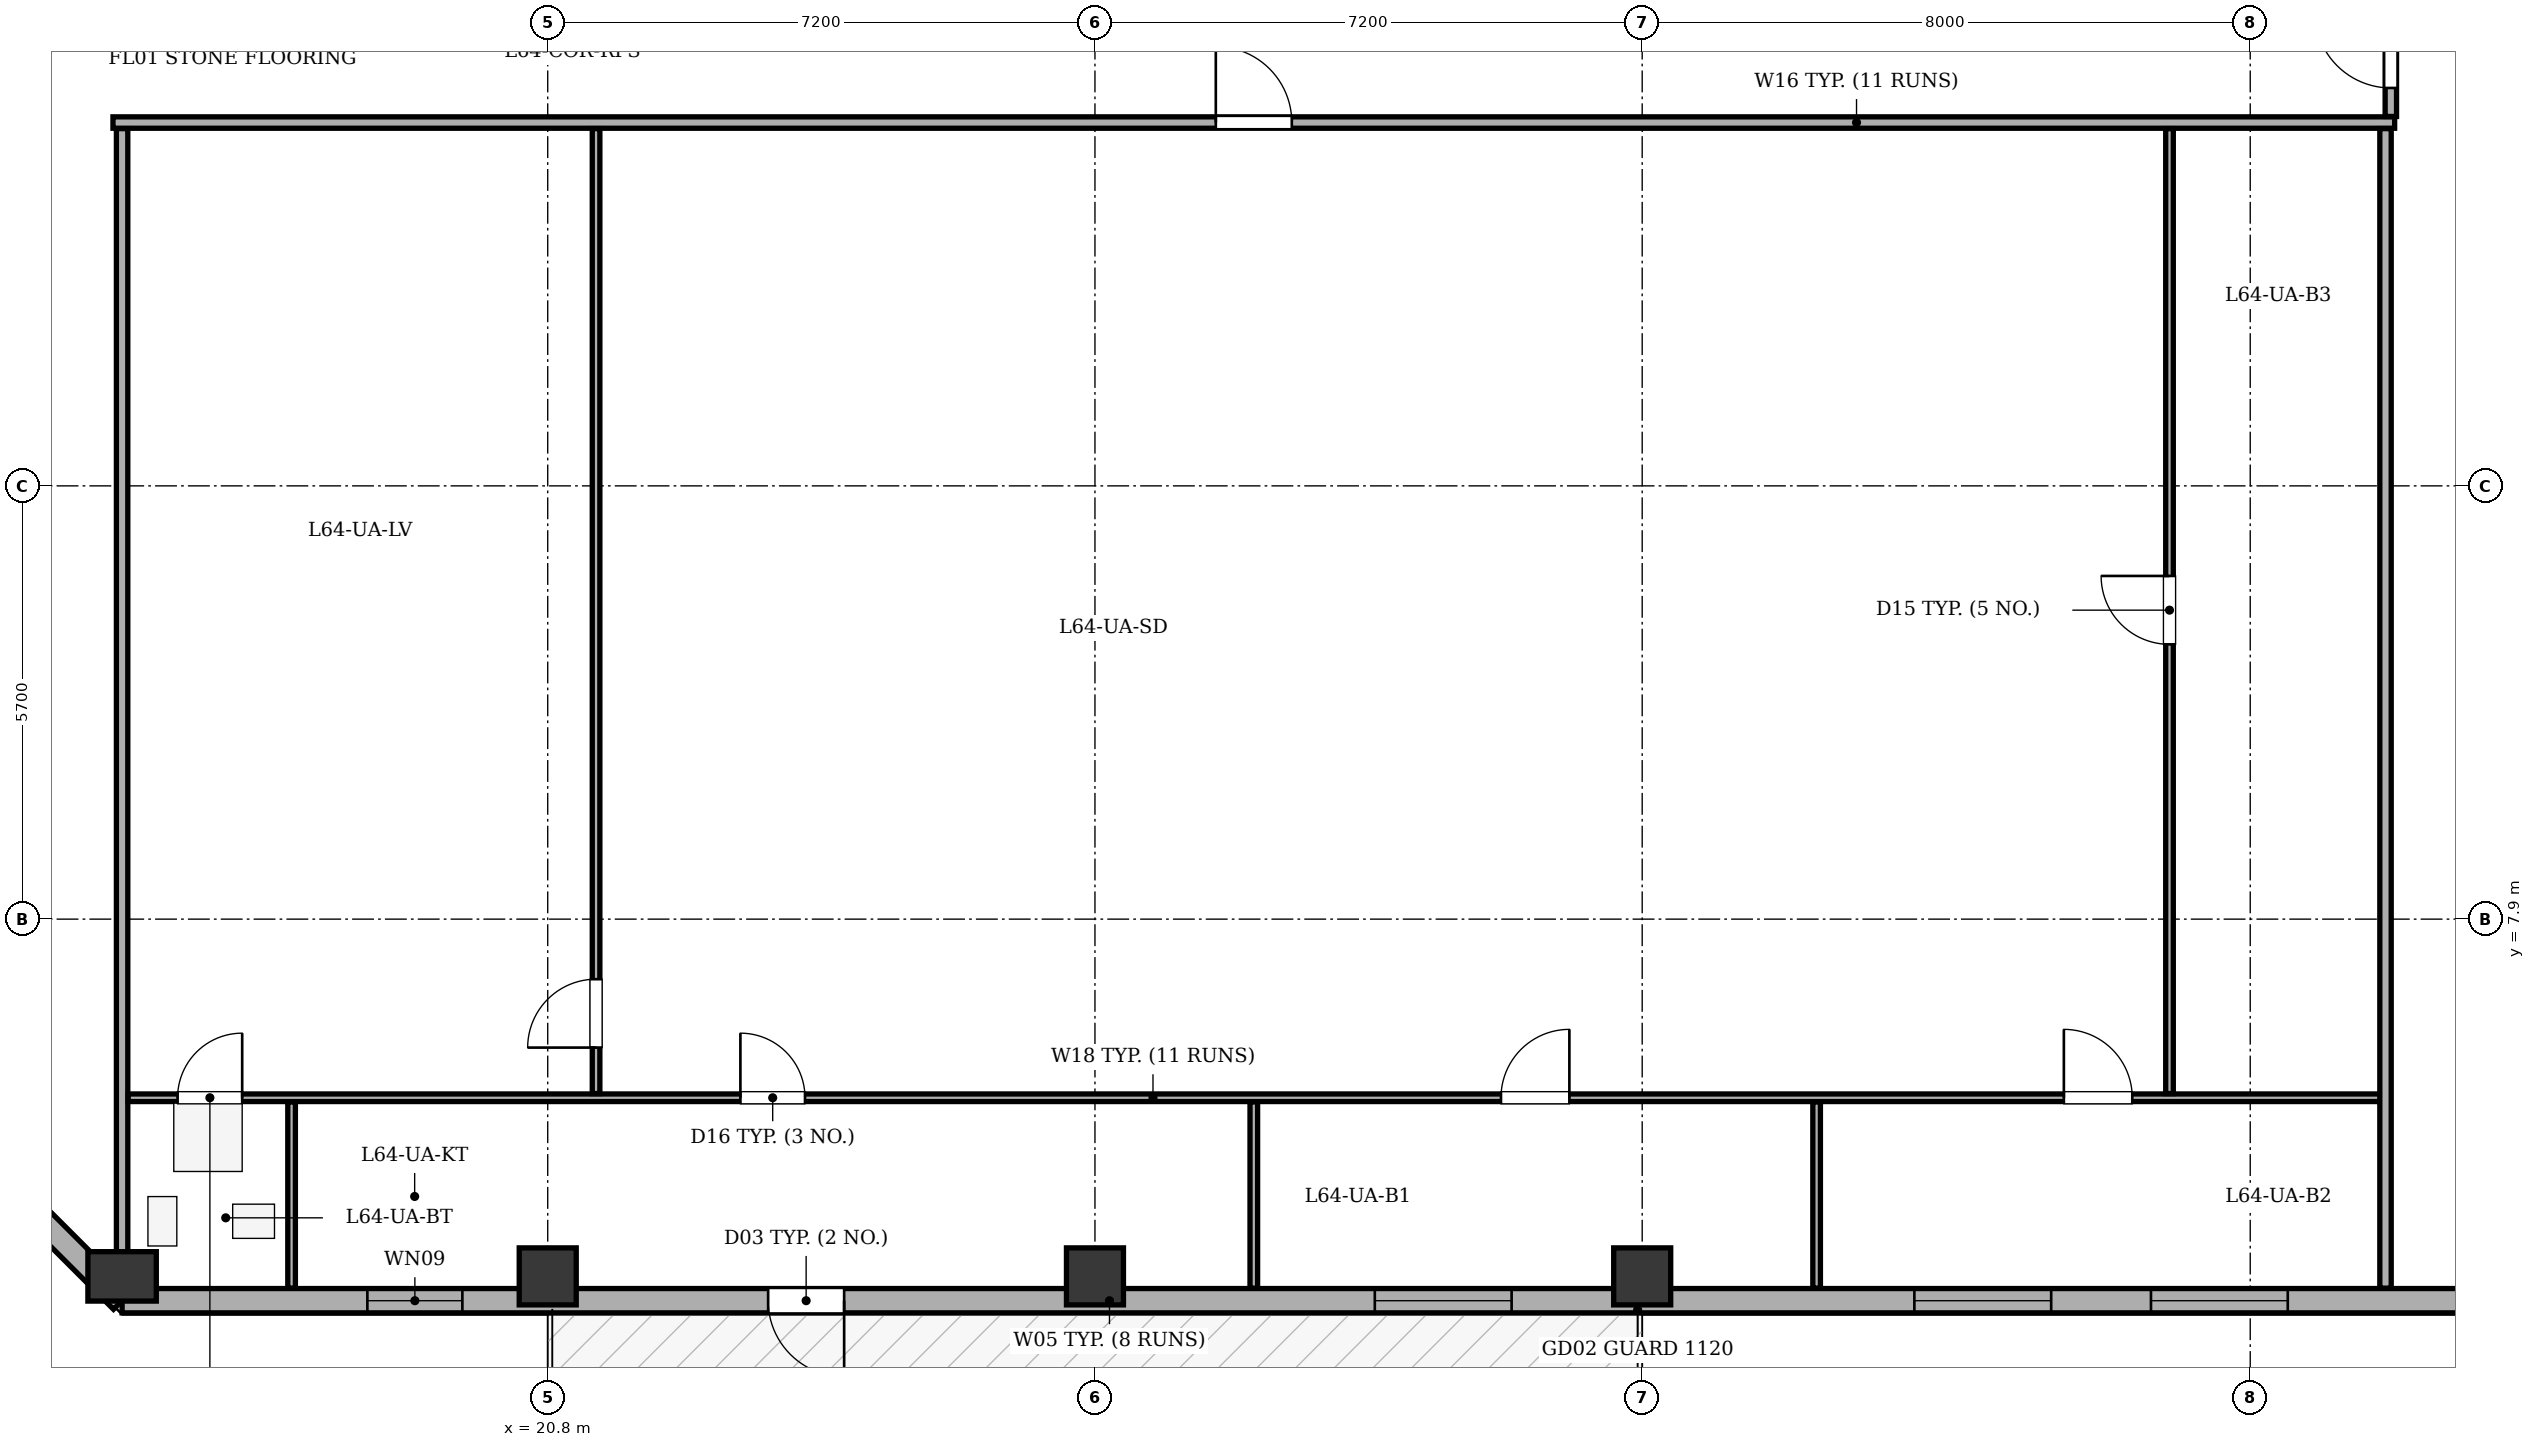
"""IFC4 building model, lengths in metres.
Left out: names, types, materials, properties, quantities, classifications, styles, units other than length and angle.
Written with IfcOpenShell. Run it as: python <this file> out.ifc"""

import sys

from ifc_helpers import new_model, si_unit, direction, frame, frame_2d, origin, origin_2d, place, context, subcontext, project, spatial, rectangle, extrude, element, fill, save


model = new_model("IFC4")
c1 = context("Model", 3, precision=1e-05, world=origin(), true_north=direction((0.0, 1.0)))
c2 = subcontext(c1, "Body", "Model", "MODEL_VIEW")
j1 = project(units=[si_unit("LENGTHUNIT", "METRE"), si_unit("PLANEANGLEUNIT", "RADIAN")], contexts=[c1])
p1 = place(None, origin())
s1 = spatial("IfcSite", under=j1, at=p1, CompositionType="ELEMENT")
p2 = place(p1, origin())
s2 = spatial("IfcBuilding", under=s1, at=p2, CompositionType="ELEMENT")
p3 = place(p2, frame((0.0, 0.0, 244.9)))
s3 = spatial("IfcBuildingStorey", under=s2, at=p3, CompositionType="ELEMENT", Elevation=244.9)
p4 = place(p3, frame((15.2, 3.2, 0.0), z_axis=(0.0, 0.0, 1.0), x_axis=(1.0, 0.0, 0.0)))
e1 = element("IfcColumn", 1, at=p4, inside=s3, PredefinedType="COLUMN", context=c2, shape_type="SweptSolid", body=[
    extrude(rectangle(XDim=0.65, YDim=0.9, at=origin_2d()), origin(), (0.0, 0.0, 1.0), 3.4),
])
for number, where, z_axis, x_axis in (
    (2, (20.8, 3.2, 0.0), (0.0, 0.0, 1.0), (1.0, 0.0, 0.0)),
    (3, (28.0, 3.2, 0.0), (0.0, 0.0, 1.0), (1.0, 0.0, 0.0)),
    (4, (35.2, 3.2, 0.0), (0.0, 0.0, 1.0), (1.0, 0.0, 0.0)),
):
    element("IfcColumn", number, at=place(p3, frame(where, z_axis=z_axis, x_axis=x_axis)), inside=s3, PredefinedType="COLUMN", context=c2, shape_type="SweptSolid", body=[
        extrude(rectangle(XDim=0.75, YDim=0.75, at=origin_2d()), origin(), (0.0, 0.0, 1.0), 3.4),
    ])
p5 = place(p3, frame((51.2, 2.88, 0.0), z_axis=(0.0, 0.0, 1.0), x_axis=(-1.0, 0.0, 0.0)))
e5 = element("IfcWall", 5, at=p5, inside=s3, PredefinedType="STANDARD", context=c2, shape_type="SweptSolid", body=[
    extrude(rectangle(XDim=36.0, YDim=0.32, at=frame_2d((18.0, 0.0))), origin(), (0.0, 0.0, 1.0), 2.335),
])
p6 = place(p5, frame((26.5, 0.0, 0.0)))
e6 = element("IfcOpeningElement", 6, at=p6, cuts=e5, PredefinedType="OPENING", context=c2, shape_type="SweptSolid", body=[
    extrude(rectangle(XDim=1.0, YDim=2.02, at=frame_2d((0.5, 1.01))), frame((0.0, 0.17, 0.0), z_axis=(0.0, -1.0, 0.0), x_axis=(1.0, 0.0, 0.0)), (0.0, 0.0, 1.0), 0.34),
])
p7 = place(p5, frame((2.31, 0.0, 0.75)))
e7 = element("IfcOpeningElement", 7, at=p7, cuts=e5, PredefinedType="OPENING", context=c2, shape_type="SweptSolid", body=[
    extrude(rectangle(XDim=1.8, YDim=1.465, at=frame_2d((0.9, 0.732))), frame((0.0, 0.17, 0.0), z_axis=(0.0, -1.0, 0.0), x_axis=(1.0, 0.0, 0.0)), (0.0, 0.0, 1.0), 0.34),
])
p8 = place(p5, frame((7.506, 0.0, 0.75)))
e8 = element("IfcOpeningElement", 8, at=p8, cuts=e5, PredefinedType="OPENING", context=c2, shape_type="SweptSolid", body=[
    extrude(rectangle(XDim=1.8, YDim=1.465, at=frame_2d((0.9, 0.732))), frame((0.0, 0.17, 0.0), z_axis=(0.0, -1.0, 0.0), x_axis=(1.0, 0.0, 0.0)), (0.0, 0.0, 1.0), 0.34),
])
p9 = place(p5, frame((10.619, 0.0, 0.75)))
e9 = element("IfcOpeningElement", 9, at=p9, cuts=e5, PredefinedType="OPENING", context=c2, shape_type="SweptSolid", body=[
    extrude(rectangle(XDim=1.8, YDim=1.465, at=frame_2d((0.9, 0.732))), frame((0.0, 0.17, 0.0), z_axis=(0.0, -1.0, 0.0), x_axis=(1.0, 0.0, 0.0)), (0.0, 0.0, 1.0), 0.34),
])
p10 = place(p5, frame((17.718, 0.0, 0.75)))
e10 = element("IfcOpeningElement", 10, at=p10, cuts=e5, PredefinedType="OPENING", context=c2, shape_type="SweptSolid", body=[
    extrude(rectangle(XDim=1.8, YDim=1.465, at=frame_2d((0.9, 0.732))), frame((0.0, 0.17, 0.0), z_axis=(0.0, -1.0, 0.0), x_axis=(1.0, 0.0, 0.0)), (0.0, 0.0, 1.0), 0.34),
])
p11 = place(p5, frame((31.523, 0.0, 0.75)))
e11 = element("IfcOpeningElement", 11, at=p11, cuts=e5, PredefinedType="OPENING", context=c2, shape_type="SweptSolid", body=[
    extrude(rectangle(XDim=1.25, YDim=1.465, at=frame_2d((0.625, 0.732))), frame((0.0, 0.17, 0.0), z_axis=(0.0, -1.0, 0.0), x_axis=(1.0, 0.0, 0.0)), (0.0, 0.0, 1.0), 0.34),
])
p12 = place(p3, frame((15.2, 2.88, 0.0), z_axis=(0.0, 0.0, 1.0), x_axis=(-0.707106781187, 0.707106781187, 0.0)))
e12 = element("IfcWall", 12, at=p12, inside=s3, PredefinedType="STANDARD", context=c2, shape_type="SweptSolid", body=[
    extrude(rectangle(XDim=6.11, YDim=0.32, at=frame_2d((3.055, 0.0))), origin(), (0.0, 0.0, 1.0), 2.335),
])
p13 = place(p12, frame((2.355, 0.0, 0.75)))
e13 = element("IfcOpeningElement", 13, at=p13, cuts=e12, PredefinedType="OPENING", context=c2, shape_type="SweptSolid", body=[
    extrude(rectangle(XDim=1.4, YDim=1.465, at=frame_2d((0.7, 0.732))), frame((0.0, 0.17, 0.0), z_axis=(0.0, -1.0, 0.0), x_axis=(1.0, 0.0, 0.0)), (0.0, 0.0, 1.0), 0.34),
])
p14 = place(p3, frame((15.08, 18.38, 0.0), z_axis=(0.0, 0.0, 1.0), x_axis=(1.0, 0.0, 0.0)))
e14 = element("IfcWall", 14, at=p14, inside=s3, PredefinedType="PARTITIONING", context=c2, shape_type="SweptSolid", body=[
    extrude(rectangle(XDim=30.02, YDim=0.15, at=frame_2d((15.01, 0.0))), origin(), (0.0, 0.0, 1.0), 2.95),
])
p15 = place(p14, frame((14.51, 0.0, 0.0)))
e15 = element("IfcOpeningElement", 15, at=p15, cuts=e14, PredefinedType="OPENING", context=c2, shape_type="SweptSolid", body=[
    extrude(rectangle(XDim=1.0, YDim=2.1, at=frame_2d((0.5, 1.05))), frame((0.0, 0.085, 0.0), z_axis=(0.0, -1.0, 0.0), x_axis=(1.0, 0.0, 0.0)), (0.0, 0.0, 1.0), 0.17),
])
p16 = place(p3, frame((15.2, 3.045, 0.0), z_axis=(0.0, 0.0, 1.0), x_axis=(0.0, 1.0, 0.0)))
e16 = element("IfcWall", 16, at=p16, inside=s3, PredefinedType="PARTITIONING", context=c2, shape_type="SweptSolid", body=[
    extrude(rectangle(XDim=15.255, YDim=0.15, at=frame_2d((7.627, 0.0))), origin(), (0.0, 0.0, 1.0), 2.95),
])
p17 = place(p3, frame((15.28, 5.55, 0.0), z_axis=(0.0, 0.0, 1.0), x_axis=(1.0, 0.0, 0.0)))
e17 = element("IfcWall", 17, at=p17, inside=s3, PredefinedType="PARTITIONING", context=c2, shape_type="SweptSolid", body=[
    extrude(rectangle(XDim=29.74, YDim=0.1, at=frame_2d((14.87, 0.0))), origin(), (0.0, 0.0, 1.0), 2.95),
])
p18 = place(p17, frame((0.65, 0.0, 0.0)))
e18 = element("IfcOpeningElement", 18, at=p18, cuts=e17, PredefinedType="OPENING", context=c2, shape_type="SweptSolid", body=[
    extrude(rectangle(XDim=0.85, YDim=2.05, at=frame_2d((0.425, 1.025))), frame((0.0, 0.06, 0.0), z_axis=(0.0, -1.0, 0.0), x_axis=(1.0, 0.0, 0.0)), (0.0, 0.0, 1.0), 0.12),
])
p19 = place(p17, frame((8.055, 0.0, 0.0)))
e19 = element("IfcOpeningElement", 19, at=p19, cuts=e17, PredefinedType="OPENING", context=c2, shape_type="SweptSolid", body=[
    extrude(rectangle(XDim=0.85, YDim=2.05, at=frame_2d((0.425, 1.025))), frame((0.0, 0.06, 0.0), z_axis=(0.0, -1.0, 0.0), x_axis=(1.0, 0.0, 0.0)), (0.0, 0.0, 1.0), 0.12),
])
p20 = place(p17, frame((18.062, 0.0, 0.0)))
e20 = element("IfcOpeningElement", 20, at=p20, cuts=e17, PredefinedType="OPENING", context=c2, shape_type="SweptSolid", body=[
    extrude(rectangle(XDim=0.9, YDim=2.05, at=frame_2d((0.45, 1.025))), frame((0.0, 0.06, 0.0), z_axis=(0.0, -1.0, 0.0), x_axis=(1.0, 0.0, 0.0)), (0.0, 0.0, 1.0), 0.12),
])
p21 = place(p17, frame((25.468, 0.0, 0.0)))
e21 = element("IfcOpeningElement", 21, at=p21, cuts=e17, PredefinedType="OPENING", context=c2, shape_type="SweptSolid", body=[
    extrude(rectangle(XDim=0.9, YDim=2.05, at=frame_2d((0.45, 1.025))), frame((0.0, 0.06, 0.0), z_axis=(0.0, -1.0, 0.0), x_axis=(1.0, 0.0, 0.0)), (0.0, 0.0, 1.0), 0.12),
])
p22 = place(p3, frame((42.138, 5.605, 0.0), z_axis=(0.0, 0.0, 1.0), x_axis=(0.0, 1.0, 0.0)))
e22 = element("IfcWall", 22, at=p22, inside=s3, PredefinedType="PARTITIONING", context=c2, shape_type="SweptSolid", body=[
    extrude(rectangle(XDim=12.695, YDim=0.1, at=frame_2d((6.348, 0.0))), origin(), (0.0, 0.0, 1.0), 2.385),
])
p23 = place(p22, frame((5.91, 0.0, 0.0)))
e23 = element("IfcOpeningElement", 23, at=p23, cuts=e22, PredefinedType="OPENING", context=c2, shape_type="SweptSolid", body=[
    extrude(rectangle(XDim=0.9, YDim=2.05, at=frame_2d((0.45, 1.025))), frame((0.0, 0.06, 0.0), z_axis=(0.0, -1.0, 0.0), x_axis=(1.0, 0.0, 0.0)), (0.0, 0.0, 1.0), 0.12),
])
p24 = place(p3, frame((21.436, 5.605, 0.0), z_axis=(0.0, 0.0, 1.0), x_axis=(0.0, 1.0, 0.0)))
e24 = element("IfcWall", 24, at=p24, inside=s3, PredefinedType="PARTITIONING", context=c2, shape_type="SweptSolid", body=[
    extrude(rectangle(XDim=12.695, YDim=0.1, at=frame_2d((6.348, 0.0))), origin(), (0.0, 0.0, 1.0), 2.95),
])
p25 = place(p24, frame((0.605, 0.0, 0.0)))
e25 = element("IfcOpeningElement", 25, at=p25, cuts=e24, PredefinedType="OPENING", context=c2, shape_type="SweptSolid", body=[
    extrude(rectangle(XDim=0.9, YDim=2.05, at=frame_2d((0.45, 1.025))), frame((0.0, 0.06, 0.0), z_axis=(0.0, -1.0, 0.0), x_axis=(1.0, 0.0, 0.0)), (0.0, 0.0, 1.0), 0.12),
])
for number, where, z_axis, x_axis in (
    (26, (17.43, 3.045, 0.0), (0.0, 0.0, 1.0), (0.0, 1.0, 0.0)),
    (27, (30.09, 3.045, 0.0), (0.0, 0.0, 1.0), (0.0, 1.0, 0.0)),
    (28, (37.495, 3.045, 0.0), (0.0, 0.0, 1.0), (0.0, 1.0, 0.0)),
):
    element("IfcWall", number, at=place(p3, frame(where, z_axis=z_axis, x_axis=x_axis)), inside=s3, PredefinedType="PARTITIONING", context=c2, shape_type="SweptSolid", body=[
        extrude(rectangle(XDim=2.45, YDim=0.1, at=frame_2d((1.225, 0.0))), origin(), (0.0, 0.0, 1.0), 2.95),
    ])
p26 = place(p3, frame((44.98, 3.045, 0.0), z_axis=(0.0, 0.0, 1.0), x_axis=(0.0, 1.0, 0.0)))
e29 = element("IfcWall", 29, at=p26, inside=s3, PredefinedType="PARTITIONING", context=c2, shape_type="SweptSolid", body=[
    extrude(rectangle(XDim=15.255, YDim=0.15, at=frame_2d((7.627, 0.0))), origin(), (0.0, 0.0, 1.0), 2.385),
])
p27 = place(p3, frame((45.05, 18.46, 0.0), z_axis=(0.0, 0.0, 1.0), x_axis=(0.0, 1.0, 0.0)))
e30 = element("IfcWall", 30, at=p27, inside=s3, PredefinedType="PARTITIONING", context=c2, shape_type="SweptSolid", body=[
    extrude(rectangle(XDim=1.79, YDim=0.15, at=frame_2d((0.895, 0.0))), origin(), (0.0, 0.0, 1.0), 2.385),
])
p28 = place(p27, frame((0.375, 0.0, 0.0)))
e31 = element("IfcOpeningElement", 31, at=p28, cuts=e30, PredefinedType="OPENING", context=c2, shape_type="SweptSolid", body=[
    extrude(rectangle(XDim=1.0, YDim=2.1, at=frame_2d((0.5, 1.05))), frame((0.0, 0.085, 0.0), z_axis=(0.0, -1.0, 0.0), x_axis=(1.0, 0.0, 0.0)), (0.0, 0.0, 1.0), 0.17),
])
p29 = place(p6, origin())
e32 = element("IfcDoor", 32, at=p29, inside=s3, OperationType="SINGLE_SWING_LEFT", PredefinedType="DOOR", context=c2, shape_type="SweptSolid", body=[
    extrude(rectangle(XDim=1.0, YDim=2.02, at=frame_2d((0.5, 1.01))), frame((0.0, 0.025, 0.0), z_axis=(0.0, -1.0, 0.0), x_axis=(1.0, 0.0, 0.0)), (0.0, 0.0, 1.0), 0.05),
])
fill(e6, e32)
p30 = place(p8, origin())
e33 = element("IfcWindow", 33, at=p30, inside=s3, PartitioningType="SINGLE_PANEL", PredefinedType="WINDOW", context=c2, shape_type="SweptSolid", body=[
    extrude(rectangle(XDim=1.8, YDim=1.465, at=frame_2d((0.9, 0.732))), frame((0.0, -0.01, 0.0), z_axis=(0.0, -1.0, 0.0), x_axis=(1.0, 0.0, 0.0)), (0.0, 0.0, 1.0), 0.06),
])
fill(e8, e33)
p31 = place(p9, origin())
e34 = element("IfcWindow", 34, at=p31, inside=s3, PartitioningType="SINGLE_PANEL", PredefinedType="WINDOW", context=c2, shape_type="SweptSolid", body=[
    extrude(rectangle(XDim=1.8, YDim=1.465, at=frame_2d((0.9, 0.732))), frame((0.0, -0.01, 0.0), z_axis=(0.0, -1.0, 0.0), x_axis=(1.0, 0.0, 0.0)), (0.0, 0.0, 1.0), 0.06),
])
fill(e9, e34)
p32 = place(p10, origin())
e35 = element("IfcWindow", 35, at=p32, inside=s3, PartitioningType="SINGLE_PANEL", PredefinedType="WINDOW", context=c2, shape_type="SweptSolid", body=[
    extrude(rectangle(XDim=1.8, YDim=1.465, at=frame_2d((0.9, 0.732))), frame((0.0, -0.01, 0.0), z_axis=(0.0, -1.0, 0.0), x_axis=(1.0, 0.0, 0.0)), (0.0, 0.0, 1.0), 0.06),
])
fill(e10, e35)
p33 = place(p11, origin())
e36 = element("IfcWindow", 36, at=p33, inside=s3, PartitioningType="SINGLE_PANEL", PredefinedType="WINDOW", context=c2, shape_type="SweptSolid", body=[
    extrude(rectangle(XDim=1.25, YDim=1.465, at=frame_2d((0.625, 0.732))), frame((0.0, -0.01, 0.0), z_axis=(0.0, -1.0, 0.0), x_axis=(1.0, 0.0, 0.0)), (0.0, 0.0, 1.0), 0.06),
])
fill(e11, e36)
p34 = place(p15, origin())
e37 = element("IfcDoor", 37, at=p34, inside=s3, OperationType="SINGLE_SWING_LEFT", PredefinedType="DOOR", context=c2, shape_type="SweptSolid", body=[
    extrude(rectangle(XDim=1.0, YDim=2.1, at=frame_2d((0.5, 1.05))), frame((0.0, 0.025, 0.0), z_axis=(0.0, -1.0, 0.0), x_axis=(1.0, 0.0, 0.0)), (0.0, 0.0, 1.0), 0.05),
])
fill(e15, e37)
p35 = place(p23, origin())
e38 = element("IfcDoor", 38, at=p35, inside=s3, OperationType="SINGLE_SWING_RIGHT", PredefinedType="DOOR", context=c2, shape_type="SweptSolid", body=[
    extrude(rectangle(XDim=0.9, YDim=2.05, at=frame_2d((0.45, 1.025))), frame((0.0, 0.025, 0.0), z_axis=(0.0, -1.0, 0.0), x_axis=(1.0, 0.0, 0.0)), (0.0, 0.0, 1.0), 0.05),
])
fill(e23, e38)
p36 = place(p25, origin())
e39 = element("IfcDoor", 39, at=p36, inside=s3, OperationType="SINGLE_SWING_LEFT", PredefinedType="DOOR", context=c2, shape_type="SweptSolid", body=[
    extrude(rectangle(XDim=0.9, YDim=2.05, at=frame_2d((0.45, 1.025))), frame((0.0, 0.025, 0.0), z_axis=(0.0, -1.0, 0.0), x_axis=(1.0, 0.0, 0.0)), (0.0, 0.0, 1.0), 0.05),
])
fill(e25, e39)
p37 = place(p18, origin())
e40 = element("IfcDoor", 40, at=p37, inside=s3, OperationType="SINGLE_SWING_RIGHT", PredefinedType="DOOR", context=c2, shape_type="SweptSolid", body=[
    extrude(rectangle(XDim=0.85, YDim=2.05, at=frame_2d((0.425, 1.025))), frame((0.0, 0.025, 0.0), z_axis=(0.0, -1.0, 0.0), x_axis=(1.0, 0.0, 0.0)), (0.0, 0.0, 1.0), 0.05),
])
fill(e18, e40)
p38 = place(p19, origin())
e41 = element("IfcDoor", 41, at=p38, inside=s3, OperationType="SINGLE_SWING_LEFT", PredefinedType="DOOR", context=c2, shape_type="SweptSolid", body=[
    extrude(rectangle(XDim=0.85, YDim=2.05, at=frame_2d((0.425, 1.025))), frame((0.0, 0.025, 0.0), z_axis=(0.0, -1.0, 0.0), x_axis=(1.0, 0.0, 0.0)), (0.0, 0.0, 1.0), 0.05),
])
fill(e19, e41)
p39 = place(p20, origin())
e42 = element("IfcDoor", 42, at=p39, inside=s3, OperationType="SINGLE_SWING_RIGHT", PredefinedType="DOOR", context=c2, shape_type="SweptSolid", body=[
    extrude(rectangle(XDim=0.9, YDim=2.05, at=frame_2d((0.45, 1.025))), frame((0.0, 0.025, 0.0), z_axis=(0.0, -1.0, 0.0), x_axis=(1.0, 0.0, 0.0)), (0.0, 0.0, 1.0), 0.05),
])
fill(e20, e42)
p40 = place(p21, origin())
e43 = element("IfcDoor", 43, at=p40, inside=s3, OperationType="SINGLE_SWING_LEFT", PredefinedType="DOOR", context=c2, shape_type="SweptSolid", body=[
    extrude(rectangle(XDim=0.9, YDim=2.05, at=frame_2d((0.45, 1.025))), frame((0.0, 0.025, 0.0), z_axis=(0.0, -1.0, 0.0), x_axis=(1.0, 0.0, 0.0)), (0.0, 0.0, 1.0), 0.05),
])
fill(e21, e43)
p41 = place(p28, origin())
e44 = element("IfcDoor", 44, at=p41, inside=s3, OperationType="SINGLE_SWING_RIGHT", PredefinedType="DOOR", context=c2, shape_type="SweptSolid", body=[
    extrude(rectangle(XDim=1.0, YDim=2.1, at=frame_2d((0.5, 1.05))), frame((0.0, 0.025, 0.0), z_axis=(0.0, -1.0, 0.0), x_axis=(1.0, 0.0, 0.0)), (0.0, 0.0, 1.0), 0.05),
])
fill(e31, e44)
save(model, sys.argv[1])
